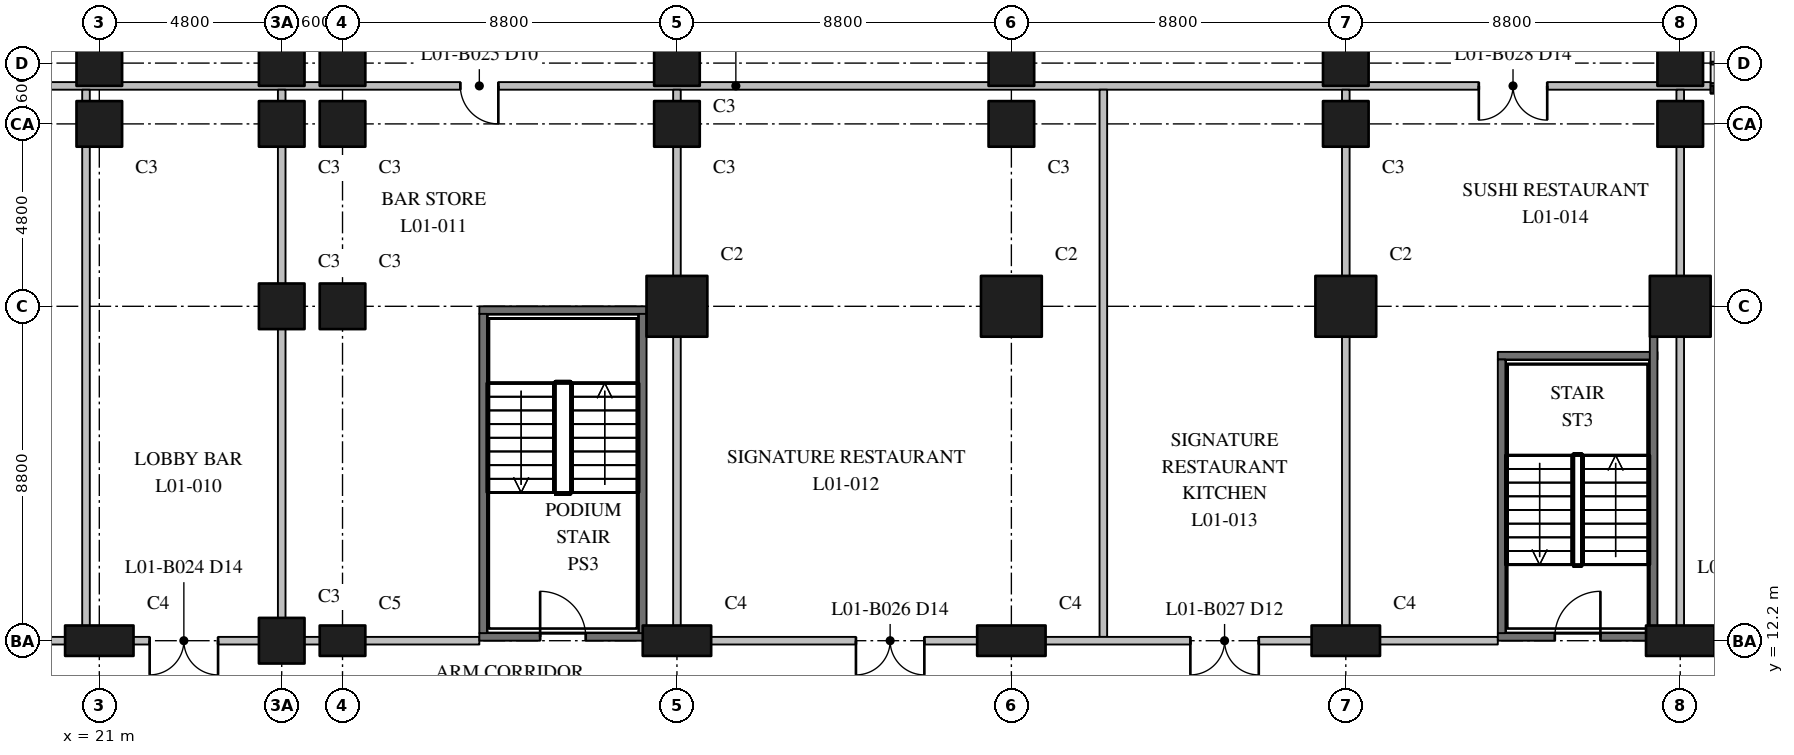
"""IFC4 building model, lengths in metres.
Left out: names, types, materials, properties, quantities, classifications, styles, units other than length and angle.
Written with IfcOpenShell. Run it as: python <this file> out.ifc"""

import sys

from ifc_helpers import new_model, si_unit, direction, frame, frame_2d, origin, origin_2d, place, context, subcontext, project, spatial, rectangle, extrude, element, fill, save


model = new_model("IFC4")
c1 = context("Model", 3, precision=1e-05, world=origin(), true_north=direction((0.0, 1.0)))
c2 = subcontext(c1, "Body", "Model", "MODEL_VIEW")
j1 = project(units=[si_unit("LENGTHUNIT", "METRE"), si_unit("PLANEANGLEUNIT", "RADIAN")], contexts=[c1])
p1 = place(None, origin())
s1 = spatial("IfcSite", under=j1, at=p1, CompositionType="ELEMENT")
p2 = place(p1, origin())
s2 = spatial("IfcBuilding", under=s1, at=p2, CompositionType="ELEMENT")
p3 = place(p2, frame((0.0, 0.0, 7.5)))
s3 = spatial("IfcBuildingStorey", under=s2, at=p3, CompositionType="ELEMENT", Elevation=7.5)
p4 = place(p3, frame((21.0, 12.2, 0.0), z_axis=(0.0, 0.0, 1.0), x_axis=(1.0, 0.0, 0.0)))
e1 = element("IfcColumn", 1, at=p4, inside=s3, PredefinedType="COLUMN", context=c2, shape_type="SweptSolid", body=[
    extrude(rectangle(XDim=1.8, YDim=0.8, at=origin_2d()), origin(), (0.0, 0.0, 1.0), 5.5),
])
for number, where, z_axis, x_axis in (
    (2, (21.0, 25.8, 0.0), (0.0, 0.0, 1.0), (1.0, 0.0, 0.0)),
    (3, (21.0, 27.4, 0.0), (0.0, 0.0, 1.0), (1.0, 0.0, 0.0)),
    (4, (25.8, 12.2, 0.0), (0.0, 0.0, 1.0), (1.0, 0.0, 0.0)),
    (5, (25.8, 21.0, 0.0), (0.0, 0.0, 1.0), (1.0, 0.0, 0.0)),
    (6, (25.8, 25.8, 0.0), (0.0, 0.0, 1.0), (1.0, 0.0, 0.0)),
    (7, (25.8, 27.4, 0.0), (0.0, 0.0, 1.0), (1.0, 0.0, 0.0)),
):
    element("IfcColumn", number, at=place(p3, frame(where, z_axis=z_axis, x_axis=x_axis)), inside=s3, PredefinedType="COLUMN", context=c2, shape_type="SweptSolid", body=[
        extrude(rectangle(XDim=1.2, YDim=1.2, at=origin_2d()), origin(), (0.0, 0.0, 1.0), 5.5),
    ])
p5 = place(p3, frame((27.4, 12.2, 0.0), z_axis=(0.0, 0.0, 1.0), x_axis=(1.0, 0.0, 0.0)))
e8 = element("IfcColumn", 8, at=p5, inside=s3, PredefinedType="COLUMN", context=c2, shape_type="SweptSolid", body=[
    extrude(rectangle(XDim=1.2, YDim=0.8, at=origin_2d()), origin(), (0.0, 0.0, 1.0), 5.5),
])
for number, where, z_axis, x_axis in (
    (9, (27.4, 21.0, 0.0), (0.0, 0.0, 1.0), (1.0, 0.0, 0.0)),
    (10, (27.4, 25.8, 0.0), (0.0, 0.0, 1.0), (1.0, 0.0, 0.0)),
):
    element("IfcColumn", number, at=place(p3, frame(where, z_axis=z_axis, x_axis=x_axis)), inside=s3, PredefinedType="COLUMN", context=c2, shape_type="SweptSolid", body=[
        extrude(rectangle(XDim=1.2, YDim=1.2, at=origin_2d()), origin(), (0.0, 0.0, 1.0), 5.5),
    ])
p6 = place(p3, frame((36.2, 12.2, 0.0), z_axis=(0.0, 0.0, 1.0), x_axis=(1.0, 0.0, 0.0)))
e11 = element("IfcColumn", 11, at=p6, inside=s3, PredefinedType="COLUMN", context=c2, shape_type="SweptSolid", body=[
    extrude(rectangle(XDim=1.8, YDim=0.8, at=origin_2d()), origin(), (0.0, 0.0, 1.0), 5.5),
])
p7 = place(p3, frame((36.2, 21.0, 0.0), z_axis=(0.0, 0.0, 1.0), x_axis=(1.0, 0.0, 0.0)))
e12 = element("IfcColumn", 12, at=p7, inside=s3, PredefinedType="COLUMN", context=c2, shape_type="SweptSolid", body=[
    extrude(rectangle(XDim=1.6, YDim=1.6, at=origin_2d()), origin(), (0.0, 0.0, 1.0), 5.5),
])
p8 = place(p3, frame((36.2, 25.8, 0.0), z_axis=(0.0, 0.0, 1.0), x_axis=(1.0, 0.0, 0.0)))
e13 = element("IfcColumn", 13, at=p8, inside=s3, PredefinedType="COLUMN", context=c2, shape_type="SweptSolid", body=[
    extrude(rectangle(XDim=1.2, YDim=1.2, at=origin_2d()), origin(), (0.0, 0.0, 1.0), 5.5),
])
p9 = place(p3, frame((45.0, 12.2, 0.0), z_axis=(0.0, 0.0, 1.0), x_axis=(1.0, 0.0, 0.0)))
e14 = element("IfcColumn", 14, at=p9, inside=s3, PredefinedType="COLUMN", context=c2, shape_type="SweptSolid", body=[
    extrude(rectangle(XDim=1.8, YDim=0.8, at=origin_2d()), origin(), (0.0, 0.0, 1.0), 5.5),
])
p10 = place(p3, frame((45.0, 21.0, 0.0), z_axis=(0.0, 0.0, 1.0), x_axis=(1.0, 0.0, 0.0)))
e15 = element("IfcColumn", 15, at=p10, inside=s3, PredefinedType="COLUMN", context=c2, shape_type="SweptSolid", body=[
    extrude(rectangle(XDim=1.6, YDim=1.6, at=origin_2d()), origin(), (0.0, 0.0, 1.0), 5.5),
])
p11 = place(p3, frame((45.0, 25.8, 0.0), z_axis=(0.0, 0.0, 1.0), x_axis=(1.0, 0.0, 0.0)))
e16 = element("IfcColumn", 16, at=p11, inside=s3, PredefinedType="COLUMN", context=c2, shape_type="SweptSolid", body=[
    extrude(rectangle(XDim=1.2, YDim=1.2, at=origin_2d()), origin(), (0.0, 0.0, 1.0), 5.5),
])
p12 = place(p3, frame((53.8, 12.2, 0.0), z_axis=(0.0, 0.0, 1.0), x_axis=(1.0, 0.0, 0.0)))
e17 = element("IfcColumn", 17, at=p12, inside=s3, PredefinedType="COLUMN", context=c2, shape_type="SweptSolid", body=[
    extrude(rectangle(XDim=1.8, YDim=0.8, at=origin_2d()), origin(), (0.0, 0.0, 1.0), 5.5),
])
p13 = place(p3, frame((53.8, 21.0, 0.0), z_axis=(0.0, 0.0, 1.0), x_axis=(1.0, 0.0, 0.0)))
e18 = element("IfcColumn", 18, at=p13, inside=s3, PredefinedType="COLUMN", context=c2, shape_type="SweptSolid", body=[
    extrude(rectangle(XDim=1.6, YDim=1.6, at=origin_2d()), origin(), (0.0, 0.0, 1.0), 5.5),
])
p14 = place(p3, frame((53.8, 25.8, 0.0), z_axis=(0.0, 0.0, 1.0), x_axis=(1.0, 0.0, 0.0)))
e19 = element("IfcColumn", 19, at=p14, inside=s3, PredefinedType="COLUMN", context=c2, shape_type="SweptSolid", body=[
    extrude(rectangle(XDim=1.2, YDim=1.2, at=origin_2d()), origin(), (0.0, 0.0, 1.0), 5.5),
])
p15 = place(p3, frame((62.6, 12.2, 0.0), z_axis=(0.0, 0.0, 1.0), x_axis=(1.0, 0.0, 0.0)))
e20 = element("IfcColumn", 20, at=p15, inside=s3, PredefinedType="COLUMN", context=c2, shape_type="SweptSolid", body=[
    extrude(rectangle(XDim=1.8, YDim=0.8, at=origin_2d()), origin(), (0.0, 0.0, 1.0), 5.5),
])
p16 = place(p3, frame((62.6, 21.0, 0.0), z_axis=(0.0, 0.0, 1.0), x_axis=(1.0, 0.0, 0.0)))
e21 = element("IfcColumn", 21, at=p16, inside=s3, PredefinedType="COLUMN", context=c2, shape_type="SweptSolid", body=[
    extrude(rectangle(XDim=1.6, YDim=1.6, at=origin_2d()), origin(), (0.0, 0.0, 1.0), 5.5),
])
for number, where, z_axis, x_axis in (
    (22, (62.6, 25.8, 0.0), (0.0, 0.0, 1.0), (1.0, 0.0, 0.0)),
    (23, (27.4, 27.4, 0.0), (0.0, 0.0, 1.0), (1.0, 0.0, 0.0)),
    (24, (36.2, 27.4, 0.0), (0.0, 0.0, 1.0), (1.0, 0.0, 0.0)),
    (25, (45.0, 27.4, 0.0), (0.0, 0.0, 1.0), (1.0, 0.0, 0.0)),
    (26, (53.8, 27.4, 0.0), (0.0, 0.0, 1.0), (1.0, 0.0, 0.0)),
    (27, (62.6, 27.4, 0.0), (0.0, 0.0, 1.0), (1.0, 0.0, 0.0)),
):
    element("IfcColumn", number, at=place(p3, frame(where, z_axis=z_axis, x_axis=x_axis)), inside=s3, PredefinedType="COLUMN", context=c2, shape_type="SweptSolid", body=[
        extrude(rectangle(XDim=1.2, YDim=1.2, at=origin_2d()), origin(), (0.0, 0.0, 1.0), 5.5),
    ])
p17 = place(p3, frame((57.8, 12.3, 0.0), z_axis=(0.0, 0.0, 1.0), x_axis=(1.0, 0.0, 0.0)))
e28 = element("IfcWall", 28, at=p17, inside=s3, PredefinedType="SHEAR", context=c2, shape_type="SweptSolid", body=[
    extrude(rectangle(XDim=4.2, YDim=0.2, at=frame_2d((2.1, 0.0))), origin(), (0.0, 0.0, 1.0), 5.1),
])
p18 = place(p17, frame((1.5, 0.0, 0.0)))
e29 = element("IfcOpeningElement", 29, at=p18, cuts=e28, PredefinedType="OPENING", context=c2, shape_type="SweptSolid", body=[
    extrude(rectangle(XDim=1.2, YDim=2.1, at=frame_2d((0.6, 1.05))), frame((0.0, 0.11, 0.0), z_axis=(0.0, -1.0, 0.0), x_axis=(1.0, 0.0, 0.0)), (0.0, 0.0, 1.0), 0.22),
])
p19 = place(p3, frame((57.8, 19.7, 0.0), z_axis=(0.0, 0.0, 1.0), x_axis=(1.0, 0.0, 0.0)))
e30 = element("IfcWall", 30, at=p19, inside=s3, PredefinedType="SHEAR", context=c2, shape_type="SweptSolid", body=[
    extrude(rectangle(XDim=4.2, YDim=0.2, at=frame_2d((2.1, 0.0))), origin(), (0.0, 0.0, 1.0), 5.1),
])
p20 = place(p3, frame((57.9, 12.4, 0.0), z_axis=(0.0, 0.0, 1.0), x_axis=(0.0, 1.0, 0.0)))
e31 = element("IfcWall", 31, at=p20, inside=s3, PredefinedType="SHEAR", context=c2, shape_type="SweptSolid", body=[
    extrude(rectangle(XDim=7.2, YDim=0.2, at=frame_2d((3.6, 0.0))), origin(), (0.0, 0.0, 1.0), 5.1),
])
p21 = place(p3, frame((61.9, 12.4, 0.0), z_axis=(0.0, 0.0, 1.0), x_axis=(0.0, 1.0, 0.0)))
e32 = element("IfcWall", 32, at=p21, inside=s3, PredefinedType="SHEAR", context=c2, shape_type="SweptSolid", body=[
    extrude(rectangle(XDim=7.8, YDim=0.2, at=frame_2d((3.9, 0.0))), origin(), (0.0, 0.0, 1.0), 5.1),
])
p22 = place(p3, frame((31.0, 12.3, 0.0), z_axis=(0.0, 0.0, 1.0), x_axis=(1.0, 0.0, 0.0)))
e33 = element("IfcWall", 33, at=p22, inside=s3, PredefinedType="SHEAR", context=c2, shape_type="SweptSolid", body=[
    extrude(rectangle(XDim=4.4, YDim=0.2, at=frame_2d((2.2, 0.0))), origin(), (0.0, 0.0, 1.0), 5.1),
])
p23 = place(p22, frame((1.6, 0.0, 0.0)))
e34 = element("IfcOpeningElement", 34, at=p23, cuts=e33, PredefinedType="OPENING", context=c2, shape_type="SweptSolid", body=[
    extrude(rectangle(XDim=1.2, YDim=2.1, at=frame_2d((0.6, 1.05))), frame((0.0, 0.11, 0.0), z_axis=(0.0, -1.0, 0.0), x_axis=(1.0, 0.0, 0.0)), (0.0, 0.0, 1.0), 0.22),
])
p24 = place(p3, frame((31.0, 20.9, 0.0), z_axis=(0.0, 0.0, 1.0), x_axis=(1.0, 0.0, 0.0)))
e35 = element("IfcWall", 35, at=p24, inside=s3, PredefinedType="SHEAR", context=c2, shape_type="SweptSolid", body=[
    extrude(rectangle(XDim=4.4, YDim=0.2, at=frame_2d((2.2, 0.0))), origin(), (0.0, 0.0, 1.0), 5.1),
])
for number, where, z_axis, x_axis in (
    (36, (31.1, 12.4, 0.0), (0.0, 0.0, 1.0), (0.0, 1.0, 0.0)),
    (37, (35.3, 12.4, 0.0), (0.0, 0.0, 1.0), (0.0, 1.0, 0.0)),
):
    element("IfcWall", number, at=place(p3, frame(where, z_axis=z_axis, x_axis=x_axis)), inside=s3, PredefinedType="SHEAR", context=c2, shape_type="SweptSolid", body=[
        extrude(rectangle(XDim=8.4, YDim=0.2, at=frame_2d((4.2, 0.0))), origin(), (0.0, 0.0, 1.0), 5.1),
    ])
p25 = place(p3, frame((12.1, 12.2, 0.0), z_axis=(0.0, 0.0, 1.0), x_axis=(1.0, 0.0, 0.0)))
e38 = element("IfcWall", 38, at=p25, inside=s3, PredefinedType="PARTITIONING", context=c2, shape_type="SweptSolid", body=[
    extrude(rectangle(XDim=18.9, YDim=0.2, at=frame_2d((9.45, 0.0))), origin(), (0.0, 0.0, 1.0), 5.1),
])
p26 = place(p25, frame((3.425, 0.0, 0.0)))
e39 = element("IfcOpeningElement", 39, at=p26, cuts=e38, PredefinedType="OPENING", context=c2, shape_type="SweptSolid", body=[
    extrude(rectangle(XDim=1.8, YDim=2.4, at=frame_2d((0.9, 1.2))), frame((0.0, 0.11, 0.0), z_axis=(0.0, -1.0, 0.0), x_axis=(1.0, 0.0, 0.0)), (0.0, 0.0, 1.0), 0.22),
])
p27 = place(p25, frame((10.225, 0.0, 0.0)))
e40 = element("IfcOpeningElement", 40, at=p27, cuts=e38, PredefinedType="OPENING", context=c2, shape_type="SweptSolid", body=[
    extrude(rectangle(XDim=1.8, YDim=2.4, at=frame_2d((0.9, 1.2))), frame((0.0, 0.11, 0.0), z_axis=(0.0, -1.0, 0.0), x_axis=(1.0, 0.0, 0.0)), (0.0, 0.0, 1.0), 0.22),
])
p28 = place(p3, frame((35.4, 12.2, 0.0), z_axis=(0.0, 0.0, 1.0), x_axis=(1.0, 0.0, 0.0)))
e41 = element("IfcWall", 41, at=p28, inside=s3, PredefinedType="PARTITIONING", context=c2, shape_type="SweptSolid", body=[
    extrude(rectangle(XDim=22.4, YDim=0.2, at=frame_2d((11.2, 0.0))), origin(), (0.0, 0.0, 1.0), 5.1),
])
p29 = place(p28, frame((5.51, 0.0, 0.0)))
e42 = element("IfcOpeningElement", 42, at=p29, cuts=e41, PredefinedType="OPENING", context=c2, shape_type="SweptSolid", body=[
    extrude(rectangle(XDim=1.8, YDim=2.4, at=frame_2d((0.9, 1.2))), frame((0.0, 0.11, 0.0), z_axis=(0.0, -1.0, 0.0), x_axis=(1.0, 0.0, 0.0)), (0.0, 0.0, 1.0), 0.22),
])
p30 = place(p28, frame((14.31, 0.0, 0.0)))
e43 = element("IfcOpeningElement", 43, at=p30, cuts=e41, PredefinedType="OPENING", context=c2, shape_type="SweptSolid", body=[
    extrude(rectangle(XDim=1.8, YDim=2.1, at=frame_2d((0.9, 1.05))), frame((0.0, 0.11, 0.0), z_axis=(0.0, -1.0, 0.0), x_axis=(1.0, 0.0, 0.0)), (0.0, 0.0, 1.0), 0.22),
])
p31 = place(p3, frame((62.0, 12.2, 0.0), z_axis=(0.0, 0.0, 1.0), x_axis=(1.0, 0.0, 0.0)))
e44 = element("IfcWall", 44, at=p31, inside=s3, PredefinedType="PARTITIONING", context=c2, shape_type="SweptSolid", body=[
    extrude(rectangle(XDim=4.6, YDim=0.2, at=frame_2d((2.3, 0.0))), origin(), (0.0, 0.0, 1.0), 5.1),
])
p32 = place(p31, frame((1.7, 0.0, 0.0)))
e45 = element("IfcOpeningElement", 45, at=p32, cuts=e44, PredefinedType="OPENING", context=c2, shape_type="SweptSolid", body=[
    extrude(rectangle(XDim=1.8, YDim=2.1, at=frame_2d((0.9, 1.05))), frame((0.0, 0.11, 0.0), z_axis=(0.0, -1.0, 0.0), x_axis=(1.0, 0.0, 0.0)), (0.0, 0.0, 1.0), 0.22),
])
p33 = place(p3, frame((12.1, 26.8, 0.0), z_axis=(0.0, 0.0, 1.0), x_axis=(1.0, 0.0, 0.0)))
e46 = element("IfcWall", 46, at=p33, inside=s3, PredefinedType="PARTITIONING", context=c2, shape_type="SweptSolid", body=[
    extrude(rectangle(XDim=51.3, YDim=0.2, at=frame_2d((25.65, 0.0))), origin(), (0.0, 0.0, 1.0), 5.1),
])
p34 = place(p33, frame((18.4, 0.0, 0.0)))
e47 = element("IfcOpeningElement", 47, at=p34, cuts=e46, PredefinedType="OPENING", context=c2, shape_type="SweptSolid", body=[
    extrude(rectangle(XDim=1.0, YDim=2.1, at=frame_2d((0.5, 1.05))), frame((0.0, 0.11, 0.0), z_axis=(0.0, -1.0, 0.0), x_axis=(1.0, 0.0, 0.0)), (0.0, 0.0, 1.0), 0.22),
])
p35 = place(p33, frame((45.2, 0.0, 0.0)))
e48 = element("IfcOpeningElement", 48, at=p35, cuts=e46, PredefinedType="OPENING", context=c2, shape_type="SweptSolid", body=[
    extrude(rectangle(XDim=1.8, YDim=2.4, at=frame_2d((0.9, 1.2))), frame((0.0, 0.11, 0.0), z_axis=(0.0, -1.0, 0.0), x_axis=(1.0, 0.0, 0.0)), (0.0, 0.0, 1.0), 0.22),
])
for number, where, z_axis, x_axis in (
    (49, (36.2, 12.3, 0.0), (0.0, 0.0, 1.0), (0.0, 1.0, 0.0)),
    (50, (20.65, 12.3, 0.0), (0.0, 0.0, 1.0), (0.0, 1.0, 0.0)),
    (51, (25.8, 12.3, 0.0), (0.0, 0.0, 1.0), (0.0, 1.0, 0.0)),
    (52, (47.42, 12.3, 0.0), (0.0, 0.0, 1.0), (0.0, 1.0, 0.0)),
    (53, (53.8, 12.3, 0.0), (0.0, 0.0, 1.0), (0.0, 1.0, 0.0)),
    (54, (62.6, 12.3, 0.0), (0.0, 0.0, 1.0), (0.0, 1.0, 0.0)),
):
    element("IfcWall", number, at=place(p3, frame(where, z_axis=z_axis, x_axis=x_axis)), inside=s3, PredefinedType="PARTITIONING", context=c2, shape_type="SweptSolid", body=[
        extrude(rectangle(XDim=14.4, YDim=0.2, at=frame_2d((7.2, 0.0))), origin(), (0.0, 0.0, 1.0), 5.1),
    ])
p36 = place(p18, origin())
e55 = element("IfcDoor", 55, at=p36, inside=s3, OperationType="SINGLE_SWING_RIGHT", PredefinedType="DOOR", context=c2, shape_type="SweptSolid", body=[
    extrude(rectangle(XDim=1.2, YDim=2.1, at=frame_2d((0.6, 1.05))), frame((0.0, 0.025, 0.0), z_axis=(0.0, -1.0, 0.0), x_axis=(1.0, 0.0, 0.0)), (0.0, 0.0, 1.0), 0.05),
])
fill(e29, e55)
p37 = place(p23, origin())
e56 = element("IfcDoor", 56, at=p37, inside=s3, OperationType="SINGLE_SWING_LEFT", PredefinedType="DOOR", context=c2, shape_type="SweptSolid", body=[
    extrude(rectangle(XDim=1.2, YDim=2.1, at=frame_2d((0.6, 1.05))), frame((0.0, 0.025, 0.0), z_axis=(0.0, -1.0, 0.0), x_axis=(1.0, 0.0, 0.0)), (0.0, 0.0, 1.0), 0.05),
])
fill(e34, e56)
p38 = place(p27, frame((1.8, 0.0, 0.0), z_axis=(0.0, 0.0, 1.0), x_axis=(-1.0, 0.0, 0.0)))
e57 = element("IfcDoor", 57, at=p38, inside=s3, OperationType="DOUBLE_DOOR_SINGLE_SWING", PredefinedType="DOOR", context=c2, shape_type="SweptSolid", body=[
    extrude(rectangle(XDim=1.8, YDim=2.4, at=frame_2d((0.9, 1.2))), frame((0.0, 0.025, 0.0), z_axis=(0.0, -1.0, 0.0), x_axis=(1.0, 0.0, 0.0)), (0.0, 0.0, 1.0), 0.05),
])
fill(e40, e57)
p39 = place(p34, frame((1.0, 0.0, 0.0), z_axis=(0.0, 0.0, 1.0), x_axis=(-1.0, 0.0, 0.0)))
e58 = element("IfcDoor", 58, at=p39, inside=s3, OperationType="SINGLE_SWING_RIGHT", PredefinedType="DOOR", context=c2, shape_type="SweptSolid", body=[
    extrude(rectangle(XDim=1.0, YDim=2.1, at=frame_2d((0.5, 1.05))), frame((0.0, 0.025, 0.0), z_axis=(0.0, -1.0, 0.0), x_axis=(1.0, 0.0, 0.0)), (0.0, 0.0, 1.0), 0.05),
])
fill(e47, e58)
p40 = place(p29, frame((1.8, 0.0, 0.0), z_axis=(0.0, 0.0, 1.0), x_axis=(-1.0, 0.0, 0.0)))
e59 = element("IfcDoor", 59, at=p40, inside=s3, OperationType="DOUBLE_DOOR_SINGLE_SWING", PredefinedType="DOOR", context=c2, shape_type="SweptSolid", body=[
    extrude(rectangle(XDim=1.8, YDim=2.4, at=frame_2d((0.9, 1.2))), frame((0.0, 0.025, 0.0), z_axis=(0.0, -1.0, 0.0), x_axis=(1.0, 0.0, 0.0)), (0.0, 0.0, 1.0), 0.05),
])
fill(e42, e59)
p41 = place(p30, frame((1.8, 0.0, 0.0), z_axis=(0.0, 0.0, 1.0), x_axis=(-1.0, 0.0, 0.0)))
e60 = element("IfcDoor", 60, at=p41, inside=s3, OperationType="DOUBLE_DOOR_SINGLE_SWING", PredefinedType="DOOR", context=c2, shape_type="SweptSolid", body=[
    extrude(rectangle(XDim=1.8, YDim=2.1, at=frame_2d((0.9, 1.05))), frame((0.0, 0.025, 0.0), z_axis=(0.0, -1.0, 0.0), x_axis=(1.0, 0.0, 0.0)), (0.0, 0.0, 1.0), 0.05),
])
fill(e43, e60)
p42 = place(p35, frame((1.8, 0.0, 0.0), z_axis=(0.0, 0.0, 1.0), x_axis=(-1.0, 0.0, 0.0)))
e61 = element("IfcDoor", 61, at=p42, inside=s3, OperationType="DOUBLE_DOOR_SINGLE_SWING", PredefinedType="DOOR", context=c2, shape_type="SweptSolid", body=[
    extrude(rectangle(XDim=1.8, YDim=2.4, at=frame_2d((0.9, 1.2))), frame((0.0, 0.025, 0.0), z_axis=(0.0, -1.0, 0.0), x_axis=(1.0, 0.0, 0.0)), (0.0, 0.0, 1.0), 0.05),
])
fill(e48, e61)
save(model, sys.argv[1])
